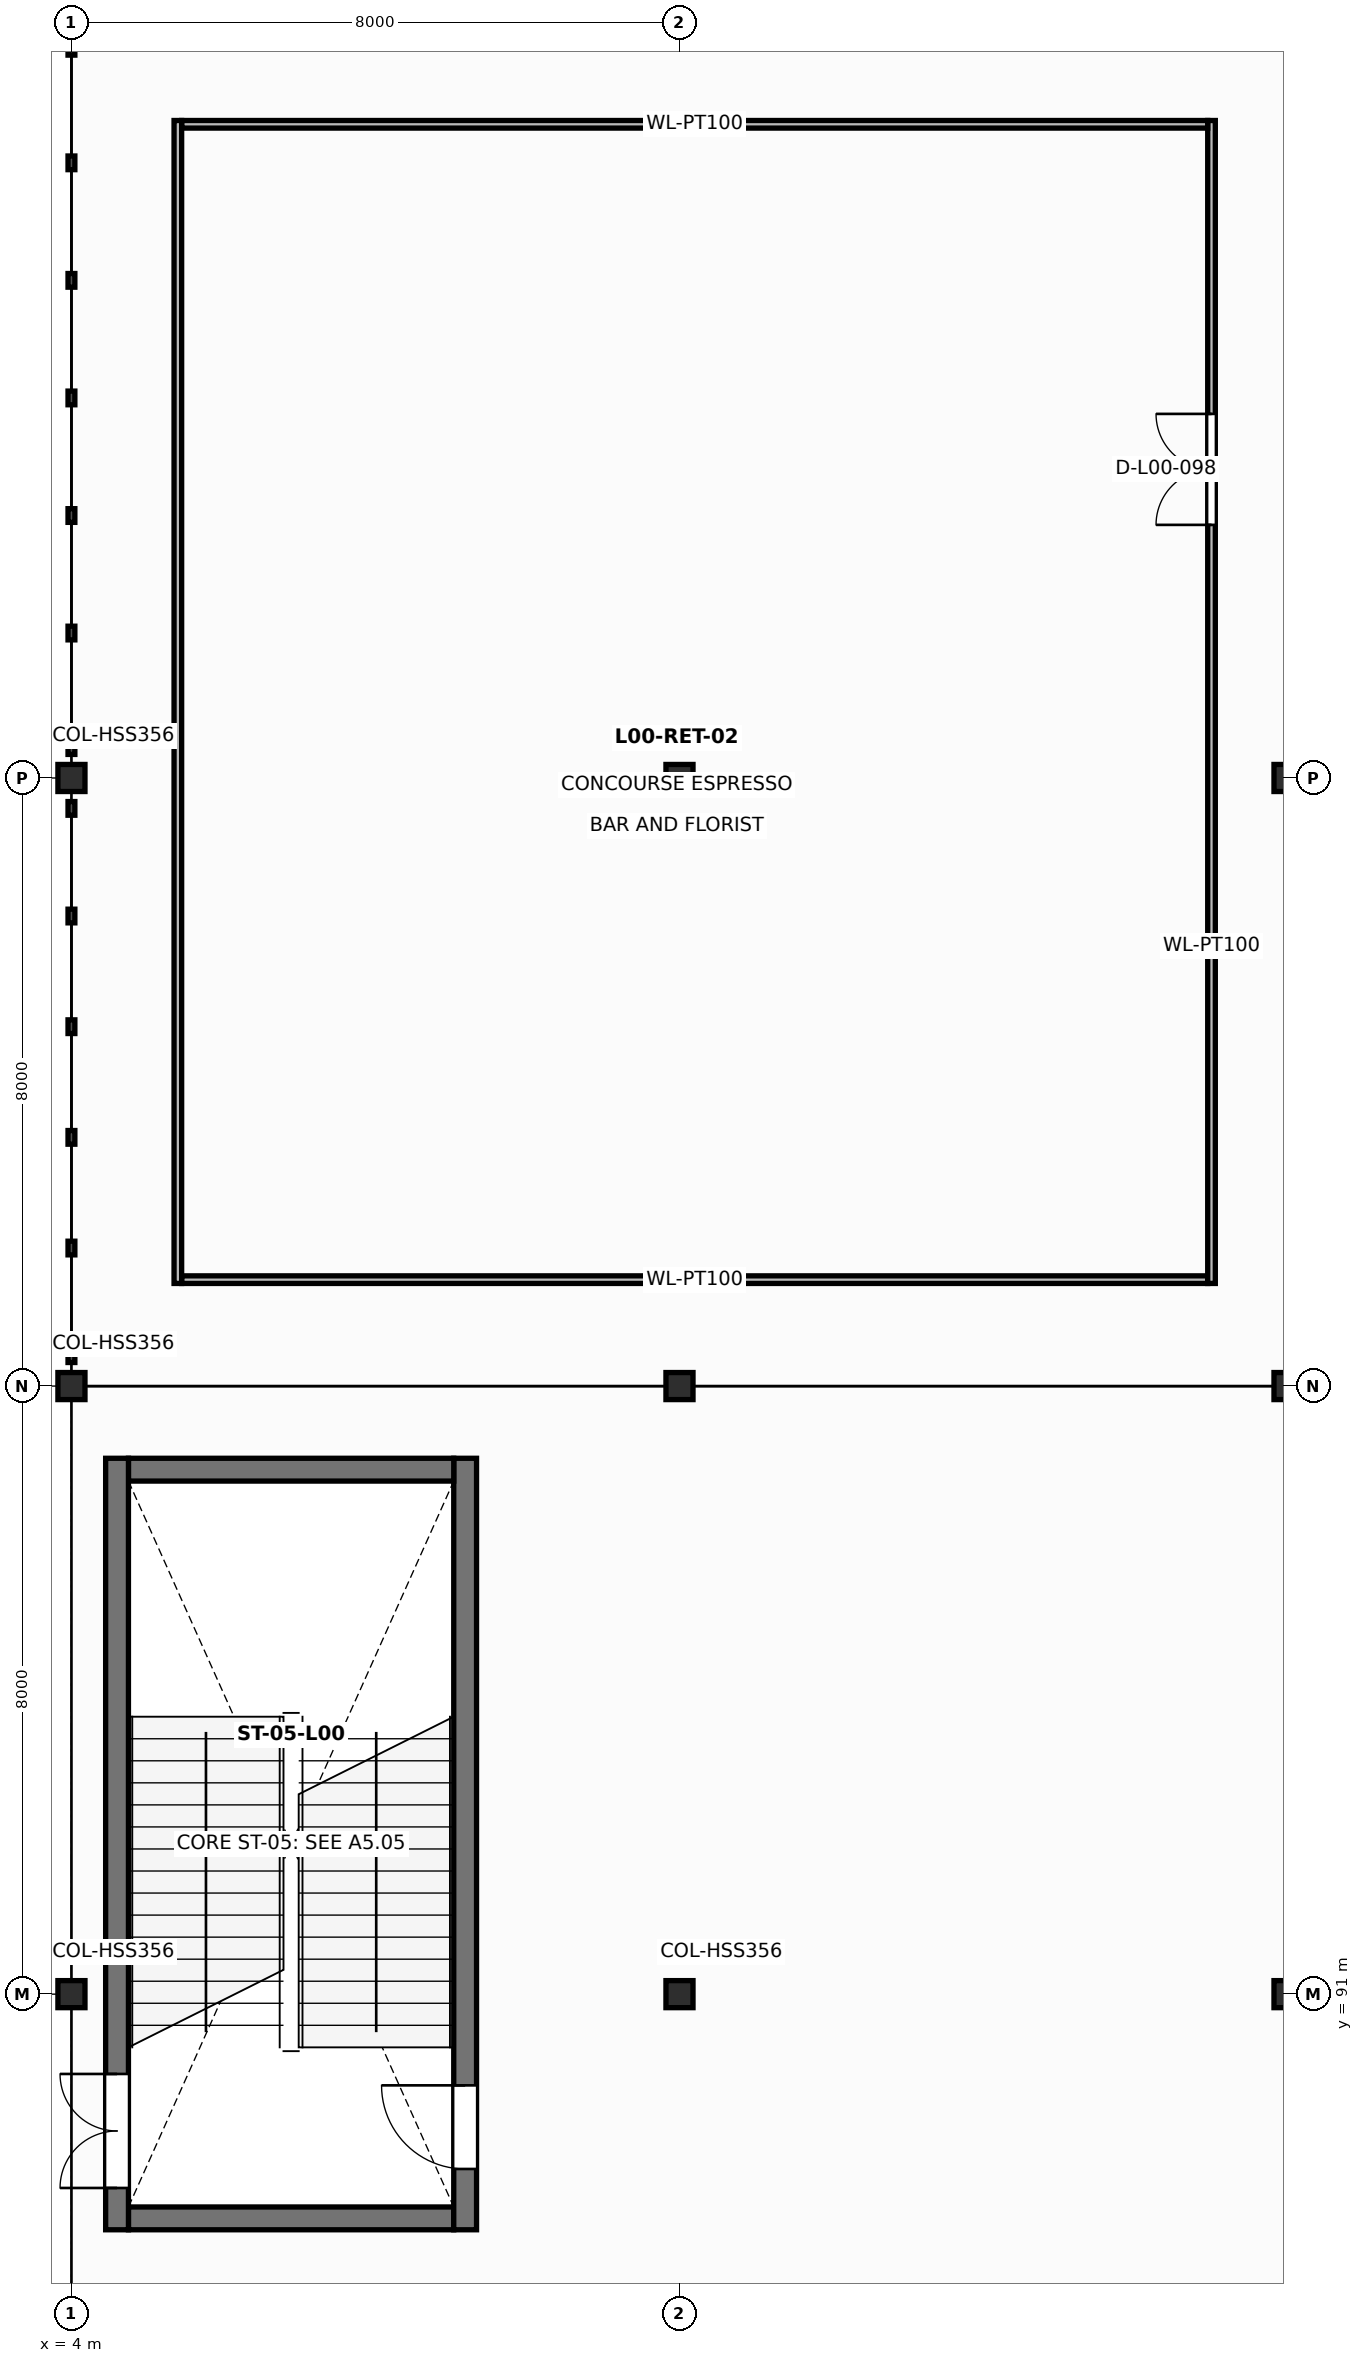
"""IFC4 building model, lengths in metres.
Left out: names, types, materials, properties, quantities, classifications, styles, units other than length and angle.
Written with IfcOpenShell. Run it as: python <this file> out.ifc"""

import sys

from ifc_helpers import new_model, si_unit, direction, frame, frame_2d, origin, origin_2d, place, context, subcontext, project, spatial, rectangle, hollow_rectangle, extrude, element, fill, save


model = new_model("IFC4")
c1 = context("Model", 3, precision=1e-05, world=origin(), true_north=direction((0.0, 1.0)))
c2 = subcontext(c1, "Body", "Model", "MODEL_VIEW")
j1 = project(units=[si_unit("LENGTHUNIT", "METRE"), si_unit("PLANEANGLEUNIT", "RADIAN")], contexts=[c1])
p1 = place(None, origin())
s1 = spatial("IfcSite", under=j1, at=p1, CompositionType="ELEMENT")
p2 = place(p1, origin())
s2 = spatial("IfcBuilding", under=s1, at=p2, CompositionType="ELEMENT")
p3 = place(p2, origin())
s3 = spatial("IfcBuildingStorey", under=s2, at=p3, CompositionType="ELEMENT", Elevation=0.0)
for number, where, z_axis, x_axis in (
    (1, (4.0, 91.0, 0.0), (0.0, 0.0, 1.0), (1.0, 0.0, 0.0)),
    (2, (4.0, 99.0, 0.0), (0.0, 0.0, 1.0), (1.0, 0.0, 0.0)),
):
    element("IfcColumn", number, at=place(p3, frame(where, z_axis=z_axis, x_axis=x_axis)), inside=s3, PredefinedType="COLUMN", context=c2, shape_type="SweptSolid", body=[
        extrude(hollow_rectangle(XDim=0.356, YDim=0.356, WallThickness=0.015, at=origin_2d()), origin(), (0.0, 0.0, 1.0), 6.0),
    ])
p4 = place(p3, frame((4.0, 107.0, 0.0), z_axis=(0.0, 0.0, 1.0), x_axis=(1.0, 0.0, 0.0)))
e3 = element("IfcColumn", 3, at=p4, inside=s3, PredefinedType="COLUMN", context=c2, shape_type="SweptSolid", body=[
    extrude(hollow_rectangle(XDim=0.356, YDim=0.356, WallThickness=0.015, at=origin_2d()), origin(), (0.0, 0.0, 1.0), 7.65),
])
for number, where, z_axis, x_axis in (
    (4, (12.0, 91.0, 0.0), (0.0, 0.0, 1.0), (1.0, 0.0, 0.0)),
    (5, (12.0, 99.0, 0.0), (0.0, 0.0, 1.0), (1.0, 0.0, 0.0)),
):
    element("IfcColumn", number, at=place(p3, frame(where, z_axis=z_axis, x_axis=x_axis)), inside=s3, PredefinedType="COLUMN", context=c2, shape_type="SweptSolid", body=[
        extrude(hollow_rectangle(XDim=0.356, YDim=0.356, WallThickness=0.015, at=origin_2d()), origin(), (0.0, 0.0, 1.0), 6.0),
    ])
p5 = place(p3, frame((12.0, 107.0, 0.0), z_axis=(0.0, 0.0, 1.0), x_axis=(1.0, 0.0, 0.0)))
e6 = element("IfcColumn", 6, at=p5, inside=s3, PredefinedType="COLUMN", context=c2, shape_type="SweptSolid", body=[
    extrude(hollow_rectangle(XDim=0.356, YDim=0.356, WallThickness=0.015, at=origin_2d()), origin(), (0.0, 0.0, 1.0), 7.65),
])
for number, where, z_axis, x_axis in (
    (7, (20.0, 91.0, 0.0), (0.0, 0.0, 1.0), (1.0, 0.0, 0.0)),
    (8, (20.0, 99.0, 0.0), (0.0, 0.0, 1.0), (1.0, 0.0, 0.0)),
):
    element("IfcColumn", number, at=place(p3, frame(where, z_axis=z_axis, x_axis=x_axis)), inside=s3, PredefinedType="COLUMN", context=c2, shape_type="SweptSolid", body=[
        extrude(hollow_rectangle(XDim=0.356, YDim=0.356, WallThickness=0.015, at=origin_2d()), origin(), (0.0, 0.0, 1.0), 6.0),
    ])
p6 = place(p3, frame((20.0, 107.0, 0.0), z_axis=(0.0, 0.0, 1.0), x_axis=(1.0, 0.0, 0.0)))
e9 = element("IfcColumn", 9, at=p6, inside=s3, PredefinedType="COLUMN", context=c2, shape_type="SweptSolid", body=[
    extrude(hollow_rectangle(XDim=0.356, YDim=0.356, WallThickness=0.015, at=origin_2d()), origin(), (0.0, 0.0, 1.0), 7.65),
])
p7 = place(p3, frame((4.75, 88.05, 0.0), z_axis=(0.0, 0.0, 1.0), x_axis=(1.0, 0.0, 0.0)))
e10 = element("IfcWall", 10, at=p7, inside=s3, PredefinedType="SHEAR", context=c2, shape_type="SweptSolid", body=[
    extrude(rectangle(XDim=4.28, YDim=0.3, at=frame_2d((2.14, 0.0))), origin(), (0.0, 0.0, 1.0), 5.755),
])
p8 = place(p3, frame((9.18, 87.9, 0.0), z_axis=(0.0, 0.0, 1.0), x_axis=(0.0, 1.0, 0.0)))
e11 = element("IfcWall", 11, at=p8, inside=s3, PredefinedType="SHEAR", context=c2, shape_type="SweptSolid", body=[
    extrude(rectangle(XDim=10.15, YDim=0.3, at=frame_2d((5.075, 0.0))), origin(), (0.0, 0.0, 1.0), 5.755),
])
p9 = place(p8, frame((0.8, 0.0, 0.0)))
e12 = element("IfcOpeningElement", 12, at=p9, cuts=e11, PredefinedType="OPENING", context=c2, shape_type="SweptSolid", body=[
    extrude(rectangle(XDim=1.1, YDim=2.15, at=frame_2d((0.55, 1.075))), frame((0.0, 0.16, 0.0), z_axis=(0.0, -1.0, 0.0), x_axis=(1.0, 0.0, 0.0)), (0.0, 0.0, 1.0), 0.32),
])
p10 = place(p3, frame((9.03, 97.9, 0.0), z_axis=(0.0, 0.0, 1.0), x_axis=(-1.0, 0.0, 0.0)))
e13 = element("IfcWall", 13, at=p10, inside=s3, PredefinedType="SHEAR", context=c2, shape_type="SweptSolid", body=[
    extrude(rectangle(XDim=4.28, YDim=0.3, at=frame_2d((2.14, 0.0))), origin(), (0.0, 0.0, 1.0), 5.755),
])
p11 = place(p3, frame((4.6, 98.05, 0.0), z_axis=(0.0, 0.0, 1.0), x_axis=(0.0, -1.0, 0.0)))
e14 = element("IfcWall", 14, at=p11, inside=s3, PredefinedType="SHEAR", context=c2, shape_type="SweptSolid", body=[
    extrude(rectangle(XDim=10.15, YDim=0.3, at=frame_2d((5.075, 0.0))), origin(), (0.0, 0.0, 1.0), 5.755),
])
p12 = place(p11, frame((8.1, 0.0, 0.0)))
e15 = element("IfcOpeningElement", 15, at=p12, cuts=e14, PredefinedType="OPENING", context=c2, shape_type="SweptSolid", body=[
    extrude(rectangle(XDim=1.5, YDim=2.2, at=frame_2d((0.75, 1.1))), frame((0.0, 0.16, 0.0), z_axis=(0.0, -1.0, 0.0), x_axis=(1.0, 0.0, 0.0)), (0.0, 0.0, 1.0), 0.32),
])
p13 = place(p3, frame((5.45, 100.4, 0.0), z_axis=(0.0, 0.0, 1.0), x_axis=(1.0, 0.0, 0.0)))
e16 = element("IfcWall", 16, at=p13, inside=s3, PredefinedType="PARTITIONING", context=c2, shape_type="SweptSolid", body=[
    extrude(rectangle(XDim=13.5, YDim=0.1, at=frame_2d((6.75, 0.0))), origin(), (0.0, 0.0, 1.0), 5.73),
])
p14 = place(p3, frame((19.0, 100.35, 0.0), z_axis=(0.0, 0.0, 1.0), x_axis=(0.0, 1.0, 0.0)))
e17 = element("IfcWall", 17, at=p14, inside=s3, PredefinedType="PARTITIONING", context=c2, shape_type="SweptSolid", body=[
    extrude(rectangle(XDim=15.3, YDim=0.1, at=frame_2d((7.65, 0.0))), origin(), (0.0, 0.0, 1.0), 5.73),
])
p15 = place(p14, frame((9.98, 0.0, 0.0)))
e18 = element("IfcOpeningElement", 18, at=p15, cuts=e17, PredefinedType="OPENING", context=c2, shape_type="SweptSolid", body=[
    extrude(rectangle(XDim=1.46, YDim=2.2, at=frame_2d((0.73, 1.1))), frame((0.0, 0.06, 0.0), z_axis=(0.0, -1.0, 0.0), x_axis=(1.0, 0.0, 0.0)), (0.0, 0.0, 1.0), 0.12),
])
p16 = place(p3, frame((18.95, 115.6, 0.0), z_axis=(0.0, 0.0, 1.0), x_axis=(-1.0, 0.0, 0.0)))
e19 = element("IfcWall", 19, at=p16, inside=s3, PredefinedType="PARTITIONING", context=c2, shape_type="SweptSolid", body=[
    extrude(rectangle(XDim=13.5, YDim=0.1, at=frame_2d((6.75, 0.0))), origin(), (0.0, 0.0, 1.0), 5.73),
])
p17 = place(p3, frame((5.4, 115.65, 0.0), z_axis=(0.0, 0.0, 1.0), x_axis=(0.0, -1.0, 0.0)))
e20 = element("IfcWall", 20, at=p17, inside=s3, PredefinedType="PARTITIONING", context=c2, shape_type="SweptSolid", body=[
    extrude(rectangle(XDim=15.3, YDim=0.1, at=frame_2d((7.65, 0.0))), origin(), (0.0, 0.0, 1.0), 5.73),
])
p18 = place(p9, origin())
e21 = element("IfcDoor", 21, at=p18, inside=s3, OperationType="SINGLE_SWING_RIGHT", PredefinedType="DOOR", context=c2, shape_type="SweptSolid", body=[
    extrude(rectangle(XDim=1.1, YDim=2.15, at=frame_2d((0.55, 1.075))), frame((0.0, 0.025, 0.0), z_axis=(0.0, -1.0, 0.0), x_axis=(1.0, 0.0, 0.0)), (0.0, 0.0, 1.0), 0.05),
])
fill(e12, e21)
p19 = place(p12, frame((1.5, 0.0, 0.0), z_axis=(0.0, 0.0, 1.0), x_axis=(-1.0, 0.0, 0.0)))
e22 = element("IfcDoor", 22, at=p19, inside=s3, OperationType="DOUBLE_DOOR_SINGLE_SWING", PredefinedType="DOOR", context=c2, shape_type="SweptSolid", body=[
    extrude(rectangle(XDim=1.5, YDim=2.2, at=frame_2d((0.75, 1.1))), frame((0.0, 0.025, 0.0), z_axis=(0.0, -1.0, 0.0), x_axis=(1.0, 0.0, 0.0)), (0.0, 0.0, 1.0), 0.05),
])
fill(e15, e22)
p20 = place(p15, origin())
e23 = element("IfcDoor", 23, at=p20, inside=s3, OperationType="DOUBLE_DOOR_SINGLE_SWING", PredefinedType="DOOR", context=c2, shape_type="SweptSolid", body=[
    extrude(rectangle(XDim=1.46, YDim=2.2, at=frame_2d((0.73, 1.1))), frame((0.0, 0.025, 0.0), z_axis=(0.0, -1.0, 0.0), x_axis=(1.0, 0.0, 0.0)), (0.0, 0.0, 1.0), 0.05),
])
fill(e18, e23)
save(model, sys.argv[1])
